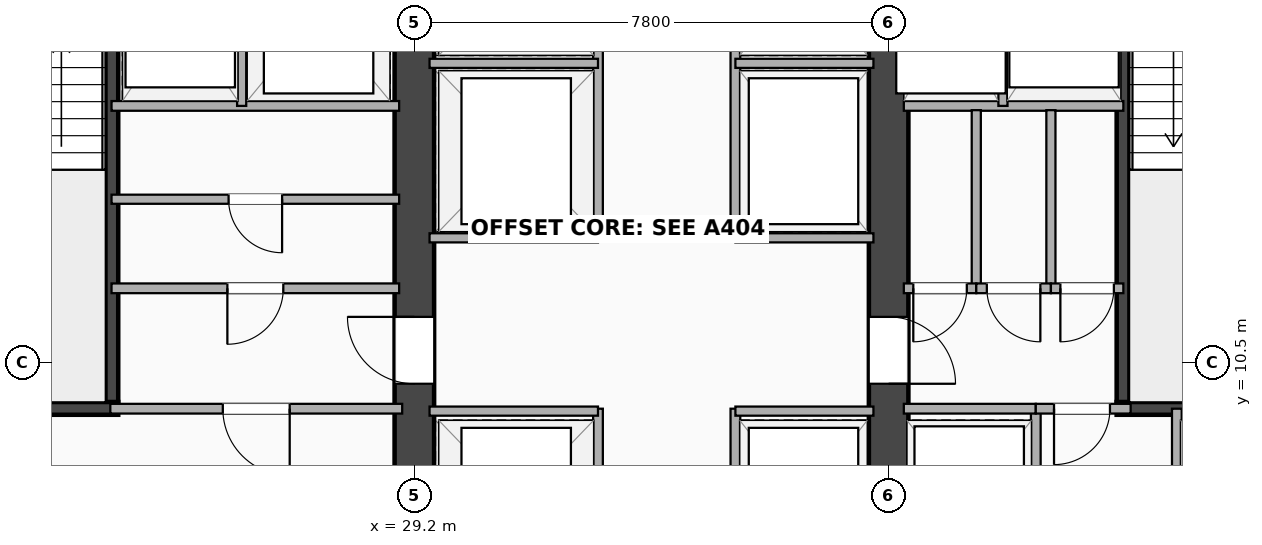
"""IFC4 building model, lengths in metres.
Left out: names, types, materials, properties, quantities, classifications, styles, units other than length and angle.
Written with IfcOpenShell. Run it as: python <this file> out.ifc"""

import sys

from ifc_helpers import new_model, si_unit, direction, frame, frame_2d, origin, place, context, subcontext, project, spatial, rectangle, extrude, element, fill, save


model = new_model("IFC4")
c1 = context("Model", 3, precision=1e-05, world=origin(), true_north=direction((0.0, 1.0)))
c2 = subcontext(c1, "Body", "Model", "MODEL_VIEW")
j1 = project(units=[si_unit("LENGTHUNIT", "METRE"), si_unit("PLANEANGLEUNIT", "RADIAN")], contexts=[c1])
p1 = place(None, origin())
s1 = spatial("IfcSite", under=j1, at=p1, CompositionType="ELEMENT")
p2 = place(p1, origin())
s2 = spatial("IfcBuilding", under=s1, at=p2, CompositionType="ELEMENT")
p3 = place(p2, frame((0.0, 0.0, 50.9)))
s3 = spatial("IfcBuildingStorey", under=s2, at=p3, CompositionType="ELEMENT", Elevation=50.9)
p4 = place(p3, frame((29.2, 3.5, 0.0), z_axis=(0.0, 0.0, 1.0), x_axis=(0.0, 1.0, 0.0)))
e1 = element("IfcWall", 1, at=p4, inside=s3, PredefinedType="SHEAR", context=c2, shape_type="SweptSolid", body=[
    extrude(rectangle(XDim=16.9, YDim=0.65, at=frame_2d((8.45, 0.0))), origin(), (0.0, 0.0, 1.0), 3.22),
])
p5 = place(p4, frame((7.75, 0.0, 0.0), z_axis=(0.0, 0.0, 1.0), x_axis=(-1.0, 0.0, 0.0)))
e2 = element("IfcOpeningElement", 2, at=p5, cuts=e1, PredefinedType="OPENING", context=c2, shape_type="SweptSolid", body=[
    extrude(rectangle(XDim=1.1, YDim=2.15, at=frame_2d((0.55, 1.075))), frame((0.0, 0.335, 0.0), z_axis=(0.0, -1.0, 0.0), x_axis=(1.0, 0.0, 0.0)), (0.0, 0.0, 1.0), 0.67),
])
p6 = place(p3, frame((37.0, 3.5, 0.0), z_axis=(0.0, 0.0, 1.0), x_axis=(0.0, 1.0, 0.0)))
e3 = element("IfcWall", 3, at=p6, inside=s3, PredefinedType="SHEAR", context=c2, shape_type="SweptSolid", body=[
    extrude(rectangle(XDim=16.9, YDim=0.65, at=frame_2d((8.45, 0.0))), origin(), (0.0, 0.0, 1.0), 3.22),
])
p7 = place(p6, frame((6.65, 0.0, 0.0)))
e4 = element("IfcOpeningElement", 4, at=p7, cuts=e3, PredefinedType="OPENING", context=c2, shape_type="SweptSolid", body=[
    extrude(rectangle(XDim=1.1, YDim=2.15, at=frame_2d((0.55, 1.075))), frame((0.0, 0.335, 0.0), z_axis=(0.0, -1.0, 0.0), x_axis=(1.0, 0.0, 0.0)), (0.0, 0.0, 1.0), 0.67),
])
p8 = place(p3, frame((24.225, 9.745, 0.0), z_axis=(0.0, 0.0, 1.0), x_axis=(0.0, 1.0, 0.0)))
e5 = element("IfcWall", 5, at=p8, inside=s3, PredefinedType="SHEAR", context=c2, shape_type="SweptSolid", body=[
    extrude(rectangle(XDim=8.01, YDim=0.21, at=frame_2d((4.005, 0.0))), origin(), (0.0, 0.0, 1.0), 3.22),
])
p9 = place(p3, frame((20.67, 9.745, 0.0), z_axis=(0.0, 0.0, 1.0), x_axis=(1.0, 0.0, 0.0)))
e6 = element("IfcWall", 6, at=p9, inside=s3, PredefinedType="SHEAR", context=c2, shape_type="SweptSolid", body=[
    extrude(rectangle(XDim=3.66, YDim=0.21, at=frame_2d((1.83, 0.0))), origin(), (0.0, 0.0, 1.0), 3.22),
])
p10 = place(p3, frame((40.855, 9.745, 0.0), z_axis=(0.0, 0.0, 1.0), x_axis=(0.0, 1.0, 0.0)))
e7 = element("IfcWall", 7, at=p10, inside=s3, PredefinedType="SHEAR", context=c2, shape_type="SweptSolid", body=[
    extrude(rectangle(XDim=8.01, YDim=0.21, at=frame_2d((4.005, 0.0))), origin(), (0.0, 0.0, 1.0), 3.22),
])
p11 = place(p3, frame((40.75, 9.745, 0.0), z_axis=(0.0, 0.0, 1.0), x_axis=(1.0, 0.0, 0.0)))
e8 = element("IfcWall", 8, at=p11, inside=s3, PredefinedType="SHEAR", context=c2, shape_type="SweptSolid", body=[
    extrude(rectangle(XDim=3.66, YDim=0.21, at=frame_2d((1.83, 0.0))), origin(), (0.0, 0.0, 1.0), 3.22),
])
p12 = place(p3, frame((24.22, 14.72, 0.0), z_axis=(0.0, 0.0, 1.0), x_axis=(1.0, 0.0, 0.0)))
e9 = element("IfcWall", 9, at=p12, inside=s3, PredefinedType="PARTITIONING", context=c2, shape_type="SweptSolid", body=[
    extrude(rectangle(XDim=4.73, YDim=0.16, at=frame_2d((2.365, 0.0))), origin(), (0.0, 0.0, 1.0), 3.22),
])
p13 = place(p3, frame((26.36, 14.72, 0.0), z_axis=(0.0, 0.0, 1.0), x_axis=(0.0, 1.0, 0.0)))
e10 = element("IfcWall", 10, at=p13, inside=s3, PredefinedType="PARTITIONING", context=c2, shape_type="SweptSolid", body=[
    extrude(rectangle(XDim=3.04, YDim=0.15, at=frame_2d((1.52, 0.0))), origin(), (0.0, 0.0, 1.0), 3.22),
])
p14 = place(p3, frame((37.25, 14.72, 0.0), z_axis=(0.0, 0.0, 1.0), x_axis=(1.0, 0.0, 0.0)))
e11 = element("IfcWall", 11, at=p14, inside=s3, PredefinedType="PARTITIONING", context=c2, shape_type="SweptSolid", body=[
    extrude(rectangle(XDim=3.61, YDim=0.16, at=frame_2d((1.805, 0.0))), origin(), (0.0, 0.0, 1.0), 3.22),
])
p15 = place(p3, frame((38.88, 14.72, 0.0), z_axis=(0.0, 0.0, 1.0), x_axis=(0.0, 1.0, 0.0)))
e12 = element("IfcWall", 12, at=p15, inside=s3, PredefinedType="PARTITIONING", context=c2, shape_type="SweptSolid", body=[
    extrude(rectangle(XDim=3.04, YDim=0.15, at=frame_2d((1.52, 0.0))), origin(), (0.0, 0.0, 1.0), 3.22),
])
p16 = place(p3, frame((24.22, 11.72, 0.0), z_axis=(0.0, 0.0, 1.0), x_axis=(1.0, 0.0, 0.0)))
e13 = element("IfcWall", 13, at=p16, inside=s3, PredefinedType="PARTITIONING", context=c2, shape_type="SweptSolid", body=[
    extrude(rectangle(XDim=4.73, YDim=0.16, at=frame_2d((2.365, 0.0))), origin(), (0.0, 0.0, 1.0), 3.22),
])
p17 = place(p16, frame((1.905, 0.0, 0.0)))
e14 = element("IfcOpeningElement", 14, at=p17, cuts=e13, PredefinedType="OPENING", context=c2, shape_type="SweptSolid", body=[
    extrude(rectangle(XDim=0.92, YDim=2.08, at=frame_2d((0.46, 1.04))), frame((0.0, 0.09, 0.0), z_axis=(0.0, -1.0, 0.0), x_axis=(1.0, 0.0, 0.0)), (0.0, 0.0, 1.0), 0.18),
])
p18 = place(p3, frame((24.22, 13.185, 0.0), z_axis=(0.0, 0.0, 1.0), x_axis=(1.0, 0.0, 0.0)))
e15 = element("IfcWall", 15, at=p18, inside=s3, PredefinedType="PARTITIONING", context=c2, shape_type="SweptSolid", body=[
    extrude(rectangle(XDim=4.73, YDim=0.15, at=frame_2d((2.365, 0.0))), origin(), (0.0, 0.0, 1.0), 3.22),
])
p19 = place(p18, frame((1.925, 0.0, 0.0)))
e16 = element("IfcOpeningElement", 16, at=p19, cuts=e15, PredefinedType="OPENING", context=c2, shape_type="SweptSolid", body=[
    extrude(rectangle(XDim=0.88, YDim=2.08, at=frame_2d((0.44, 1.04))), frame((0.0, 0.085, 0.0), z_axis=(0.0, -1.0, 0.0), x_axis=(1.0, 0.0, 0.0)), (0.0, 0.0, 1.0), 0.17),
])
p20 = place(p3, frame((38.441, 11.72, 0.0), z_axis=(0.0, 0.0, 1.0), x_axis=(0.0, 1.0, 0.0)))
e17 = element("IfcWall", 17, at=p20, inside=s3, PredefinedType="PARTITIONING", context=c2, shape_type="SweptSolid", body=[
    extrude(rectangle(XDim=2.93, YDim=0.15, at=frame_2d((1.465, 0.0))), origin(), (0.0, 0.0, 1.0), 3.22),
])
p21 = place(p3, frame((37.25, 11.72, 0.0), z_axis=(0.0, 0.0, 1.0), x_axis=(1.0, 0.0, 0.0)))
e18 = element("IfcWall", 18, at=p21, inside=s3, PredefinedType="PARTITIONING", context=c2, shape_type="SweptSolid", body=[
    extrude(rectangle(XDim=1.191, YDim=0.16, at=frame_2d((0.596, 0.0))), origin(), (0.0, 0.0, 1.0), 3.22),
])
p22 = place(p21, frame((0.156, 0.0, 0.0)))
e19 = element("IfcOpeningElement", 19, at=p22, cuts=e18, PredefinedType="OPENING", context=c2, shape_type="SweptSolid", body=[
    extrude(rectangle(XDim=0.88, YDim=2.08, at=frame_2d((0.44, 1.04))), frame((0.0, 0.09, 0.0), z_axis=(0.0, -1.0, 0.0), x_axis=(1.0, 0.0, 0.0)), (0.0, 0.0, 1.0), 0.18),
])
p23 = place(p3, frame((39.669, 11.72, 0.0), z_axis=(0.0, 0.0, 1.0), x_axis=(0.0, 1.0, 0.0)))
e20 = element("IfcWall", 20, at=p23, inside=s3, PredefinedType="PARTITIONING", context=c2, shape_type="SweptSolid", body=[
    extrude(rectangle(XDim=2.93, YDim=0.15, at=frame_2d((1.465, 0.0))), origin(), (0.0, 0.0, 1.0), 3.22),
])
p24 = place(p3, frame((38.441, 11.72, 0.0), z_axis=(0.0, 0.0, 1.0), x_axis=(1.0, 0.0, 0.0)))
e21 = element("IfcWall", 21, at=p24, inside=s3, PredefinedType="PARTITIONING", context=c2, shape_type="SweptSolid", body=[
    extrude(rectangle(XDim=1.227, YDim=0.16, at=frame_2d((0.614, 0.0))), origin(), (0.0, 0.0, 1.0), 3.22),
])
p25 = place(p24, frame((0.174, 0.0, 0.0)))
e22 = element("IfcOpeningElement", 22, at=p25, cuts=e21, PredefinedType="OPENING", context=c2, shape_type="SweptSolid", body=[
    extrude(rectangle(XDim=0.88, YDim=2.08, at=frame_2d((0.44, 1.04))), frame((0.0, 0.09, 0.0), z_axis=(0.0, -1.0, 0.0), x_axis=(1.0, 0.0, 0.0)), (0.0, 0.0, 1.0), 0.18),
])
p26 = place(p3, frame((39.669, 11.72, 0.0), z_axis=(0.0, 0.0, 1.0), x_axis=(1.0, 0.0, 0.0)))
e23 = element("IfcWall", 23, at=p26, inside=s3, PredefinedType="PARTITIONING", context=c2, shape_type="SweptSolid", body=[
    extrude(rectangle(XDim=1.191, YDim=0.16, at=frame_2d((0.596, 0.0))), origin(), (0.0, 0.0, 1.0), 3.22),
])
p27 = place(p26, frame((0.156, 0.0, 0.0)))
e24 = element("IfcOpeningElement", 24, at=p27, cuts=e23, PredefinedType="OPENING", context=c2, shape_type="SweptSolid", body=[
    extrude(rectangle(XDim=0.88, YDim=2.08, at=frame_2d((0.44, 1.04))), frame((0.0, 0.09, 0.0), z_axis=(0.0, -1.0, 0.0), x_axis=(1.0, 0.0, 0.0)), (0.0, 0.0, 1.0), 0.18),
])
p28 = place(p3, frame((24.2, 9.74, 0.0), z_axis=(0.0, 0.0, 1.0), x_axis=(1.0, 0.0, 0.0)))
e25 = element("IfcWall", 25, at=p28, inside=s3, PredefinedType="PARTITIONING", context=c2, shape_type="SweptSolid", body=[
    extrude(rectangle(XDim=4.8, YDim=0.16, at=frame_2d((2.4, 0.0))), origin(), (0.0, 0.0, 1.0), 3.22),
])
p29 = place(p28, frame((1.85, 0.0, 0.0)))
e26 = element("IfcOpeningElement", 26, at=p29, cuts=e25, PredefinedType="OPENING", context=c2, shape_type="SweptSolid", body=[
    extrude(rectangle(XDim=1.1, YDim=2.15, at=frame_2d((0.55, 1.075))), frame((0.0, 0.09, 0.0), z_axis=(0.0, -1.0, 0.0), x_axis=(1.0, 0.0, 0.0)), (0.0, 0.0, 1.0), 0.18),
])
for number, where, z_axis, x_axis in (
    (27, (39.42, 3.9, 0.0), (0.0, 0.0, 1.0), (0.0, 1.0, 0.0)),
    (28, (41.74, 3.9, 0.0), (0.0, 0.0, 1.0), (0.0, 1.0, 0.0)),
):
    element("IfcWall", number, at=place(p3, frame(where, z_axis=z_axis, x_axis=x_axis)), inside=s3, PredefinedType="PARTITIONING", context=c2, shape_type="SweptSolid", body=[
        extrude(rectangle(XDim=5.84, YDim=0.16, at=frame_2d((2.92, 0.0))), origin(), (0.0, 0.0, 1.0), 3.22),
    ])
p30 = place(p3, frame((37.25, 9.74, 0.0), z_axis=(0.0, 0.0, 1.0), x_axis=(1.0, 0.0, 0.0)))
e29 = element("IfcWall", 29, at=p30, inside=s3, PredefinedType="PARTITIONING", context=c2, shape_type="SweptSolid", body=[
    extrude(rectangle(XDim=2.17, YDim=0.16, at=frame_2d((1.085, 0.0))), origin(), (0.0, 0.0, 1.0), 3.22),
])
p31 = place(p3, frame((39.42, 9.74, 0.0), z_axis=(0.0, 0.0, 1.0), x_axis=(1.0, 0.0, 0.0)))
e30 = element("IfcWall", 30, at=p31, inside=s3, PredefinedType="PARTITIONING", context=c2, shape_type="SweptSolid", body=[
    extrude(rectangle(XDim=1.56, YDim=0.16, at=frame_2d((0.78, 0.0))), origin(), (0.0, 0.0, 1.0), 3.22),
])
p32 = place(p31, frame((0.3, 0.0, 0.0)))
e31 = element("IfcOpeningElement", 31, at=p32, cuts=e30, PredefinedType="OPENING", context=c2, shape_type="SweptSolid", body=[
    extrude(rectangle(XDim=0.92, YDim=2.08, at=frame_2d((0.46, 1.04))), frame((0.0, 0.09, 0.0), z_axis=(0.0, -1.0, 0.0), x_axis=(1.0, 0.0, 0.0)), (0.0, 0.0, 1.0), 0.18),
])
p33 = place(p3, frame((32.22, 3.9, 0.0), z_axis=(0.0, 0.0, 1.0), x_axis=(0.0, 1.0, 0.0)))
e32 = element("IfcWall", 32, at=p33, inside=s3, PredefinedType="PARTITIONING", context=c2, shape_type="SweptSolid", body=[
    extrude(rectangle(XDim=5.84, YDim=0.16, at=frame_2d((2.92, 0.0))), origin(), (0.0, 0.0, 1.0), 3.22),
])
p34 = place(p33, frame((1.78, 0.0, 0.0), z_axis=(0.0, 0.0, 1.0), x_axis=(-1.0, 0.0, 0.0)))
e33 = element("IfcOpeningElement", 33, at=p34, cuts=e32, PredefinedType="OPENING", context=c2, shape_type="SweptSolid", body=[
    extrude(rectangle(XDim=1.08, YDim=2.16, at=frame_2d((0.54, 1.08))), frame((0.0, 0.09, 0.0), z_axis=(0.0, -1.0, 0.0), x_axis=(1.0, 0.0, 0.0)), (0.0, 0.0, 1.0), 0.18),
])
p35 = place(p33, frame((4.68, 0.0, 0.0), z_axis=(0.0, 0.0, 1.0), x_axis=(-1.0, 0.0, 0.0)))
e34 = element("IfcOpeningElement", 34, at=p35, cuts=e32, PredefinedType="OPENING", context=c2, shape_type="SweptSolid", body=[
    extrude(rectangle(XDim=1.08, YDim=2.16, at=frame_2d((0.54, 1.08))), frame((0.0, 0.09, 0.0), z_axis=(0.0, -1.0, 0.0), x_axis=(1.0, 0.0, 0.0)), (0.0, 0.0, 1.0), 0.18),
])
p36 = place(p3, frame((34.48, 3.9, 0.0), z_axis=(0.0, 0.0, 1.0), x_axis=(0.0, 1.0, 0.0)))
e35 = element("IfcWall", 35, at=p36, inside=s3, PredefinedType="PARTITIONING", context=c2, shape_type="SweptSolid", body=[
    extrude(rectangle(XDim=5.84, YDim=0.16, at=frame_2d((2.92, 0.0))), origin(), (0.0, 0.0, 1.0), 3.22),
])
p37 = place(p36, frame((0.7, 0.0, 0.0)))
e36 = element("IfcOpeningElement", 36, at=p37, cuts=e35, PredefinedType="OPENING", context=c2, shape_type="SweptSolid", body=[
    extrude(rectangle(XDim=1.08, YDim=2.16, at=frame_2d((0.54, 1.08))), frame((0.0, 0.09, 0.0), z_axis=(0.0, -1.0, 0.0), x_axis=(1.0, 0.0, 0.0)), (0.0, 0.0, 1.0), 0.18),
])
p38 = place(p36, frame((3.6, 0.0, 0.0)))
e37 = element("IfcOpeningElement", 37, at=p38, cuts=e35, PredefinedType="OPENING", context=c2, shape_type="SweptSolid", body=[
    extrude(rectangle(XDim=1.08, YDim=2.16, at=frame_2d((0.54, 1.08))), frame((0.0, 0.09, 0.0), z_axis=(0.0, -1.0, 0.0), x_axis=(1.0, 0.0, 0.0)), (0.0, 0.0, 1.0), 0.18),
])
p39 = place(p3, frame((29.45, 9.7, 0.0), z_axis=(0.0, 0.0, 1.0), x_axis=(1.0, 0.0, 0.0)))
e38 = element("IfcWall", 38, at=p39, inside=s3, PredefinedType="PARTITIONING", context=c2, shape_type="SweptSolid", body=[
    extrude(rectangle(XDim=2.77, YDim=0.15, at=frame_2d((1.385, 0.0))), origin(), (0.0, 0.0, 1.0), 3.22),
])
p40 = place(p3, frame((34.48, 9.7, 0.0), z_axis=(0.0, 0.0, 1.0), x_axis=(1.0, 0.0, 0.0)))
e39 = element("IfcWall", 39, at=p40, inside=s3, PredefinedType="PARTITIONING", context=c2, shape_type="SweptSolid", body=[
    extrude(rectangle(XDim=2.27, YDim=0.15, at=frame_2d((1.135, 0.0))), origin(), (0.0, 0.0, 1.0), 3.22),
])
p41 = place(p3, frame((32.22, 12.5, 0.0), z_axis=(0.0, 0.0, 1.0), x_axis=(0.0, 1.0, 0.0)))
e40 = element("IfcWall", 40, at=p41, inside=s3, PredefinedType="PARTITIONING", context=c2, shape_type="SweptSolid", body=[
    extrude(rectangle(XDim=7.92, YDim=0.16, at=frame_2d((3.96, 0.0))), origin(), (0.0, 0.0, 1.0), 2.51),
])
p42 = place(p41, frame((6.1, 0.0, 0.0)))
e41 = element("IfcOpeningElement", 41, at=p42, cuts=e40, PredefinedType="OPENING", context=c2, shape_type="SweptSolid", body=[
    extrude(rectangle(XDim=0.88, YDim=2.08, at=frame_2d((0.44, 1.04))), frame((0.0, 0.09, 0.0), z_axis=(0.0, -1.0, 0.0), x_axis=(1.0, 0.0, 0.0)), (0.0, 0.0, 1.0), 0.18),
])
p43 = place(p3, frame((34.48, 12.5, 0.0), z_axis=(0.0, 0.0, 1.0), x_axis=(0.0, 1.0, 0.0)))
e42 = element("IfcWall", 42, at=p43, inside=s3, PredefinedType="PARTITIONING", context=c2, shape_type="SweptSolid", body=[
    extrude(rectangle(XDim=7.92, YDim=0.16, at=frame_2d((3.96, 0.0))), origin(), (0.0, 0.0, 1.0), 2.51),
])
p44 = place(p43, frame((6.98, 0.0, 0.0), z_axis=(0.0, 0.0, 1.0), x_axis=(-1.0, 0.0, 0.0)))
e43 = element("IfcOpeningElement", 43, at=p44, cuts=e42, PredefinedType="OPENING", context=c2, shape_type="SweptSolid", body=[
    extrude(rectangle(XDim=0.88, YDim=2.08, at=frame_2d((0.44, 1.04))), frame((0.0, 0.09, 0.0), z_axis=(0.0, -1.0, 0.0), x_axis=(1.0, 0.0, 0.0)), (0.0, 0.0, 1.0), 0.18),
])
p45 = place(p3, frame((29.45, 12.55, 0.0), z_axis=(0.0, 0.0, 1.0), x_axis=(1.0, 0.0, 0.0)))
e44 = element("IfcWall", 44, at=p45, inside=s3, PredefinedType="PARTITIONING", context=c2, shape_type="SweptSolid", body=[
    extrude(rectangle(XDim=2.77, YDim=0.15, at=frame_2d((1.385, 0.0))), origin(), (0.0, 0.0, 1.0), 3.22),
])
p46 = place(p3, frame((34.48, 12.55, 0.0), z_axis=(0.0, 0.0, 1.0), x_axis=(1.0, 0.0, 0.0)))
e45 = element("IfcWall", 45, at=p46, inside=s3, PredefinedType="PARTITIONING", context=c2, shape_type="SweptSolid", body=[
    extrude(rectangle(XDim=2.27, YDim=0.15, at=frame_2d((1.135, 0.0))), origin(), (0.0, 0.0, 1.0), 3.22),
])
p47 = place(p3, frame((29.45, 15.42, 0.0), z_axis=(0.0, 0.0, 1.0), x_axis=(1.0, 0.0, 0.0)))
e46 = element("IfcWall", 46, at=p47, inside=s3, PredefinedType="PARTITIONING", context=c2, shape_type="SweptSolid", body=[
    extrude(rectangle(XDim=2.77, YDim=0.15, at=frame_2d((1.385, 0.0))), origin(), (0.0, 0.0, 1.0), 3.22),
])
p48 = place(p3, frame((34.48, 15.42, 0.0), z_axis=(0.0, 0.0, 1.0), x_axis=(1.0, 0.0, 0.0)))
e47 = element("IfcWall", 47, at=p48, inside=s3, PredefinedType="PARTITIONING", context=c2, shape_type="SweptSolid", body=[
    extrude(rectangle(XDim=2.27, YDim=0.15, at=frame_2d((1.135, 0.0))), origin(), (0.0, 0.0, 1.0), 3.22),
])
p49 = place(p5, origin())
e48 = element("IfcDoor", 48, at=p49, inside=s3, OperationType="SINGLE_SWING_RIGHT", PredefinedType="DOOR", context=c2, shape_type="SweptSolid", body=[
    extrude(rectangle(XDim=1.1, YDim=2.15, at=frame_2d((0.55, 1.075))), frame((0.0, 0.025, 0.0), z_axis=(0.0, -1.0, 0.0), x_axis=(1.0, 0.0, 0.0)), (0.0, 0.0, 1.0), 0.05),
])
fill(e2, e48)
p50 = place(p7, origin())
e49 = element("IfcDoor", 49, at=p50, inside=s3, OperationType="SINGLE_SWING_LEFT", PredefinedType="DOOR", context=c2, shape_type="SweptSolid", body=[
    extrude(rectangle(XDim=1.1, YDim=2.15, at=frame_2d((0.55, 1.075))), frame((0.0, 0.025, 0.0), z_axis=(0.0, -1.0, 0.0), x_axis=(1.0, 0.0, 0.0)), (0.0, 0.0, 1.0), 0.05),
])
fill(e4, e49)
p51 = place(p17, origin())
e50 = element("IfcDoor", 50, at=p51, inside=s3, OperationType="SINGLE_SWING_LEFT", PredefinedType="DOOR", context=c2, shape_type="SweptSolid", body=[
    extrude(rectangle(XDim=0.92, YDim=2.08, at=frame_2d((0.46, 1.04))), frame((0.0, 0.025, 0.0), z_axis=(0.0, -1.0, 0.0), x_axis=(1.0, 0.0, 0.0)), (0.0, 0.0, 1.0), 0.05),
])
fill(e14, e50)
p52 = place(p19, origin())
e51 = element("IfcDoor", 51, at=p52, inside=s3, OperationType="SINGLE_SWING_RIGHT", PredefinedType="DOOR", context=c2, shape_type="SweptSolid", body=[
    extrude(rectangle(XDim=0.88, YDim=2.08, at=frame_2d((0.44, 1.04))), frame((0.0, 0.025, 0.0), z_axis=(0.0, -1.0, 0.0), x_axis=(1.0, 0.0, 0.0)), (0.0, 0.0, 1.0), 0.05),
])
fill(e16, e51)
p53 = place(p22, origin())
e52 = element("IfcDoor", 52, at=p53, inside=s3, OperationType="SINGLE_SWING_LEFT", PredefinedType="DOOR", context=c2, shape_type="SweptSolid", body=[
    extrude(rectangle(XDim=0.88, YDim=2.08, at=frame_2d((0.44, 1.04))), frame((0.0, 0.025, 0.0), z_axis=(0.0, -1.0, 0.0), x_axis=(1.0, 0.0, 0.0)), (0.0, 0.0, 1.0), 0.05),
])
fill(e19, e52)
p54 = place(p25, origin())
e53 = element("IfcDoor", 53, at=p54, inside=s3, OperationType="SINGLE_SWING_RIGHT", PredefinedType="DOOR", context=c2, shape_type="SweptSolid", body=[
    extrude(rectangle(XDim=0.88, YDim=2.08, at=frame_2d((0.44, 1.04))), frame((0.0, 0.025, 0.0), z_axis=(0.0, -1.0, 0.0), x_axis=(1.0, 0.0, 0.0)), (0.0, 0.0, 1.0), 0.05),
])
fill(e22, e53)
p55 = place(p27, origin())
e54 = element("IfcDoor", 54, at=p55, inside=s3, OperationType="SINGLE_SWING_LEFT", PredefinedType="DOOR", context=c2, shape_type="SweptSolid", body=[
    extrude(rectangle(XDim=0.88, YDim=2.08, at=frame_2d((0.44, 1.04))), frame((0.0, 0.025, 0.0), z_axis=(0.0, -1.0, 0.0), x_axis=(1.0, 0.0, 0.0)), (0.0, 0.0, 1.0), 0.05),
])
fill(e24, e54)
p56 = place(p29, origin())
e55 = element("IfcDoor", 55, at=p56, inside=s3, OperationType="SINGLE_SWING_RIGHT", PredefinedType="DOOR", context=c2, shape_type="SweptSolid", body=[
    extrude(rectangle(XDim=1.1, YDim=2.15, at=frame_2d((0.55, 1.075))), frame((0.0, 0.025, 0.0), z_axis=(0.0, -1.0, 0.0), x_axis=(1.0, 0.0, 0.0)), (0.0, 0.0, 1.0), 0.05),
])
fill(e26, e55)
p57 = place(p32, origin())
e56 = element("IfcDoor", 56, at=p57, inside=s3, OperationType="SINGLE_SWING_LEFT", PredefinedType="DOOR", context=c2, shape_type="SweptSolid", body=[
    extrude(rectangle(XDim=0.92, YDim=2.08, at=frame_2d((0.46, 1.04))), frame((0.0, 0.025, 0.0), z_axis=(0.0, -1.0, 0.0), x_axis=(1.0, 0.0, 0.0)), (0.0, 0.0, 1.0), 0.05),
])
fill(e31, e56)
save(model, sys.argv[1])
